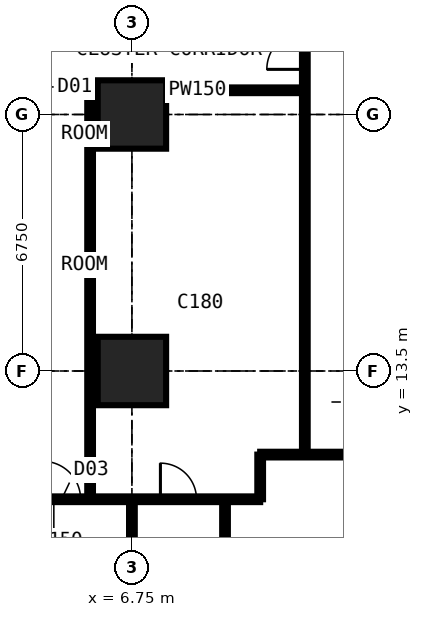
"""IFC4 building model, lengths in metres.
Left out: names, types, materials, properties, quantities, classifications, styles, units other than length and angle.
Written with IfcOpenShell. Run it as: python <this file> out.ifc"""

import sys

from ifc_helpers import new_model, si_unit, direction, frame, frame_2d, origin, origin_2d, place, context, subcontext, project, spatial, rectangle, extrude, element, fill, save


model = new_model("IFC4")
c1 = context("Model", 3, precision=1e-05, world=origin(), true_north=direction((0.0, 1.0)))
c2 = subcontext(c1, "Body", "Model", "MODEL_VIEW")
j1 = project(units=[si_unit("LENGTHUNIT", "METRE"), si_unit("PLANEANGLEUNIT", "RADIAN")], contexts=[c1])
p1 = place(None, origin())
s1 = spatial("IfcSite", under=j1, at=p1, CompositionType="ELEMENT")
p2 = place(p1, origin())
s2 = spatial("IfcBuilding", under=s1, at=p2, CompositionType="ELEMENT")
p3 = place(p2, frame((0.0, 0.0, 46.8)))
s3 = spatial("IfcBuildingStorey", under=s2, at=p3, CompositionType="ELEMENT", Elevation=46.8)
for number, where, z_axis, x_axis in (
    (1, (6.75, 13.5, 0.0), (0.0, 0.0, 1.0), (1.0, 0.0, 0.0)),
    (2, (6.75, 20.25, 0.0), (0.0, 0.0, 1.0), (1.0, 0.0, 0.0)),
):
    element("IfcColumn", number, at=place(p3, frame(where, z_axis=z_axis, x_axis=x_axis)), inside=s3, PredefinedType="COLUMN", context=c2, shape_type="SweptSolid", body=[
        extrude(rectangle(XDim=1.8, YDim=1.8, at=origin_2d()), origin(), (0.0, 0.0, 1.0), 3.6),
    ])
p4 = place(p3, frame((-0.734, 10.125, 0.0), z_axis=(0.0, 0.0, 1.0), x_axis=(1.0, 0.0, 0.0)))
e3 = element("IfcWall", 3, at=p4, inside=s3, PredefinedType="PARTITIONING", context=c2, shape_type="SweptSolid", body=[
    extrude(rectangle(XDim=10.859, YDim=0.15, at=frame_2d((5.429, 0.0))), origin(), (0.0, 0.0, 1.0), 3.375),
])
p5 = place(p4, frame((5.134, 0.0, 0.0)))
e4 = element("IfcOpeningElement", 4, at=p5, cuts=e3, PredefinedType="OPENING", context=c2, shape_type="SweptSolid", body=[
    extrude(rectangle(XDim=1.0, YDim=2.2, at=frame_2d((0.5, 1.1))), frame((0.0, 0.085, 0.0), z_axis=(0.0, -1.0, 0.0), x_axis=(1.0, 0.0, 0.0)), (0.0, 0.0, 1.0), 0.17),
])
p6 = place(p4, frame((8.234, 0.0, 0.0)))
e5 = element("IfcOpeningElement", 5, at=p6, cuts=e3, PredefinedType="OPENING", context=c2, shape_type="SweptSolid", body=[
    extrude(rectangle(XDim=0.95, YDim=2.2, at=frame_2d((0.475, 1.1))), frame((0.0, 0.085, 0.0), z_axis=(0.0, -1.0, 0.0), x_axis=(1.0, 0.0, 0.0)), (0.0, 0.0, 1.0), 0.17),
])
p7 = place(p3, frame((5.65, 10.125, 0.0), z_axis=(0.0, 0.0, 1.0), x_axis=(0.0, 1.0, 0.0)))
e6 = element("IfcWall", 6, at=p7, inside=s3, PredefinedType="PARTITIONING", context=c2, shape_type="SweptSolid", body=[
    extrude(rectangle(XDim=10.762, YDim=0.15, at=frame_2d((5.381, 0.0))), origin(), (0.0, 0.0, 1.0), 3.375),
])
p8 = place(p3, frame((5.65, 20.887, 0.0), z_axis=(0.0, 0.0, 1.0), x_axis=(1.0, 0.0, 0.0)))
e7 = element("IfcWall", 7, at=p8, inside=s3, PredefinedType="PARTITIONING", context=c2, shape_type="SweptSolid", body=[
    extrude(rectangle(XDim=5.65, YDim=0.15, at=frame_2d((2.825, 0.0))), origin(), (0.0, 0.0, 1.0), 3.375),
])
p9 = place(p3, frame((6.75, -0.734, 0.0), z_axis=(0.0, 0.0, 1.0), x_axis=(0.0, 1.0, 0.0)))
e8 = element("IfcWall", 8, at=p9, inside=s3, PredefinedType="PARTITIONING", context=c2, shape_type="SweptSolid", body=[
    extrude(rectangle(XDim=10.859, YDim=0.15, at=frame_2d((5.429, 0.0))), origin(), (0.0, 0.0, 1.0), 2.877),
])
p10 = place(p3, frame((9.2, 5.65, 0.0), z_axis=(0.0, 0.0, 1.0), x_axis=(0.0, 1.0, 0.0)))
e9 = element("IfcWall", 9, at=p10, inside=s3, PredefinedType="PARTITIONING", context=c2, shape_type="SweptSolid", body=[
    extrude(rectangle(XDim=4.475, YDim=0.15, at=frame_2d((2.238, 0.0))), origin(), (0.0, 0.0, 1.0), 3.375),
])
p11 = place(p3, frame((10.125, 10.125, 0.0), z_axis=(0.0, 0.0, 1.0), x_axis=(0.0, 1.0, 0.0)))
e10 = element("IfcWall", 10, at=p11, inside=s3, PredefinedType="PARTITIONING", context=c2, shape_type="SweptSolid", body=[
    extrude(rectangle(XDim=1.175, YDim=0.15, at=frame_2d((0.587, 0.0))), origin(), (0.0, 0.0, 1.0), 3.375),
])
p12 = place(p3, frame((10.125, 11.3, 0.0), z_axis=(0.0, 0.0, 1.0), x_axis=(1.0, 0.0, 0.0)))
e11 = element("IfcWall", 11, at=p12, inside=s3, PredefinedType="PARTITIONING", context=c2, shape_type="SweptSolid", body=[
    extrude(rectangle(XDim=20.675, YDim=0.15, at=frame_2d((10.337, 0.0))), origin(), (0.0, 0.0, 1.0), 3.375),
])
p13 = place(p12, frame((11.312, 0.0, 0.0)))
e12 = element("IfcOpeningElement", 12, at=p13, cuts=e11, PredefinedType="OPENING", context=c2, shape_type="SweptSolid", body=[
    extrude(rectangle(XDim=1.0, YDim=2.2, at=frame_2d((0.5, 1.1))), frame((0.0, 0.085, 0.0), z_axis=(0.0, -1.0, 0.0), x_axis=(1.0, 0.0, 0.0)), (0.0, 0.0, 1.0), 0.17),
])
p14 = place(p3, frame((11.3, 11.3, 0.0), z_axis=(0.0, 0.0, 1.0), x_axis=(0.0, 1.0, 0.0)))
e13 = element("IfcWall", 13, at=p14, inside=s3, PredefinedType="PARTITIONING", context=c2, shape_type="SweptSolid", body=[
    extrude(rectangle(XDim=19.075, YDim=0.15, at=frame_2d((9.538, 0.0))), origin(), (0.0, 0.0, 1.0), 3.375),
])
p15 = place(p14, frame((10.137, 0.0, 0.0)))
e14 = element("IfcOpeningElement", 14, at=p15, cuts=e13, PredefinedType="OPENING", context=c2, shape_type="SweptSolid", body=[
    extrude(rectangle(XDim=1.0, YDim=2.2, at=frame_2d((0.5, 1.1))), frame((0.0, 0.085, 0.0), z_axis=(0.0, -1.0, 0.0), x_axis=(1.0, 0.0, 0.0)), (0.0, 0.0, 1.0), 0.17),
])
p16 = place(p5, origin())
e15 = element("IfcDoor", 15, at=p16, inside=s3, OperationType="SINGLE_SWING_LEFT", PredefinedType="DOOR", context=c2, shape_type="SweptSolid", body=[
    extrude(rectangle(XDim=1.0, YDim=2.2, at=frame_2d((0.5, 1.1))), frame((0.0, 0.025, 0.0), z_axis=(0.0, -1.0, 0.0), x_axis=(1.0, 0.0, 0.0)), (0.0, 0.0, 1.0), 0.05),
])
fill(e4, e15)
p17 = place(p15, origin())
e16 = element("IfcDoor", 16, at=p17, inside=s3, OperationType="SINGLE_SWING_LEFT", PredefinedType="DOOR", context=c2, shape_type="SweptSolid", body=[
    extrude(rectangle(XDim=1.0, YDim=2.2, at=frame_2d((0.5, 1.1))), frame((0.0, 0.025, 0.0), z_axis=(0.0, -1.0, 0.0), x_axis=(1.0, 0.0, 0.0)), (0.0, 0.0, 1.0), 0.05),
])
fill(e14, e16)
p18 = place(p6, origin())
e17 = element("IfcDoor", 17, at=p18, inside=s3, OperationType="SINGLE_SWING_LEFT", PredefinedType="DOOR", context=c2, shape_type="SweptSolid", body=[
    extrude(rectangle(XDim=0.95, YDim=2.2, at=frame_2d((0.475, 1.1))), frame((0.0, 0.025, 0.0), z_axis=(0.0, -1.0, 0.0), x_axis=(1.0, 0.0, 0.0)), (0.0, 0.0, 1.0), 0.05),
])
fill(e5, e17)
save(model, sys.argv[1])
